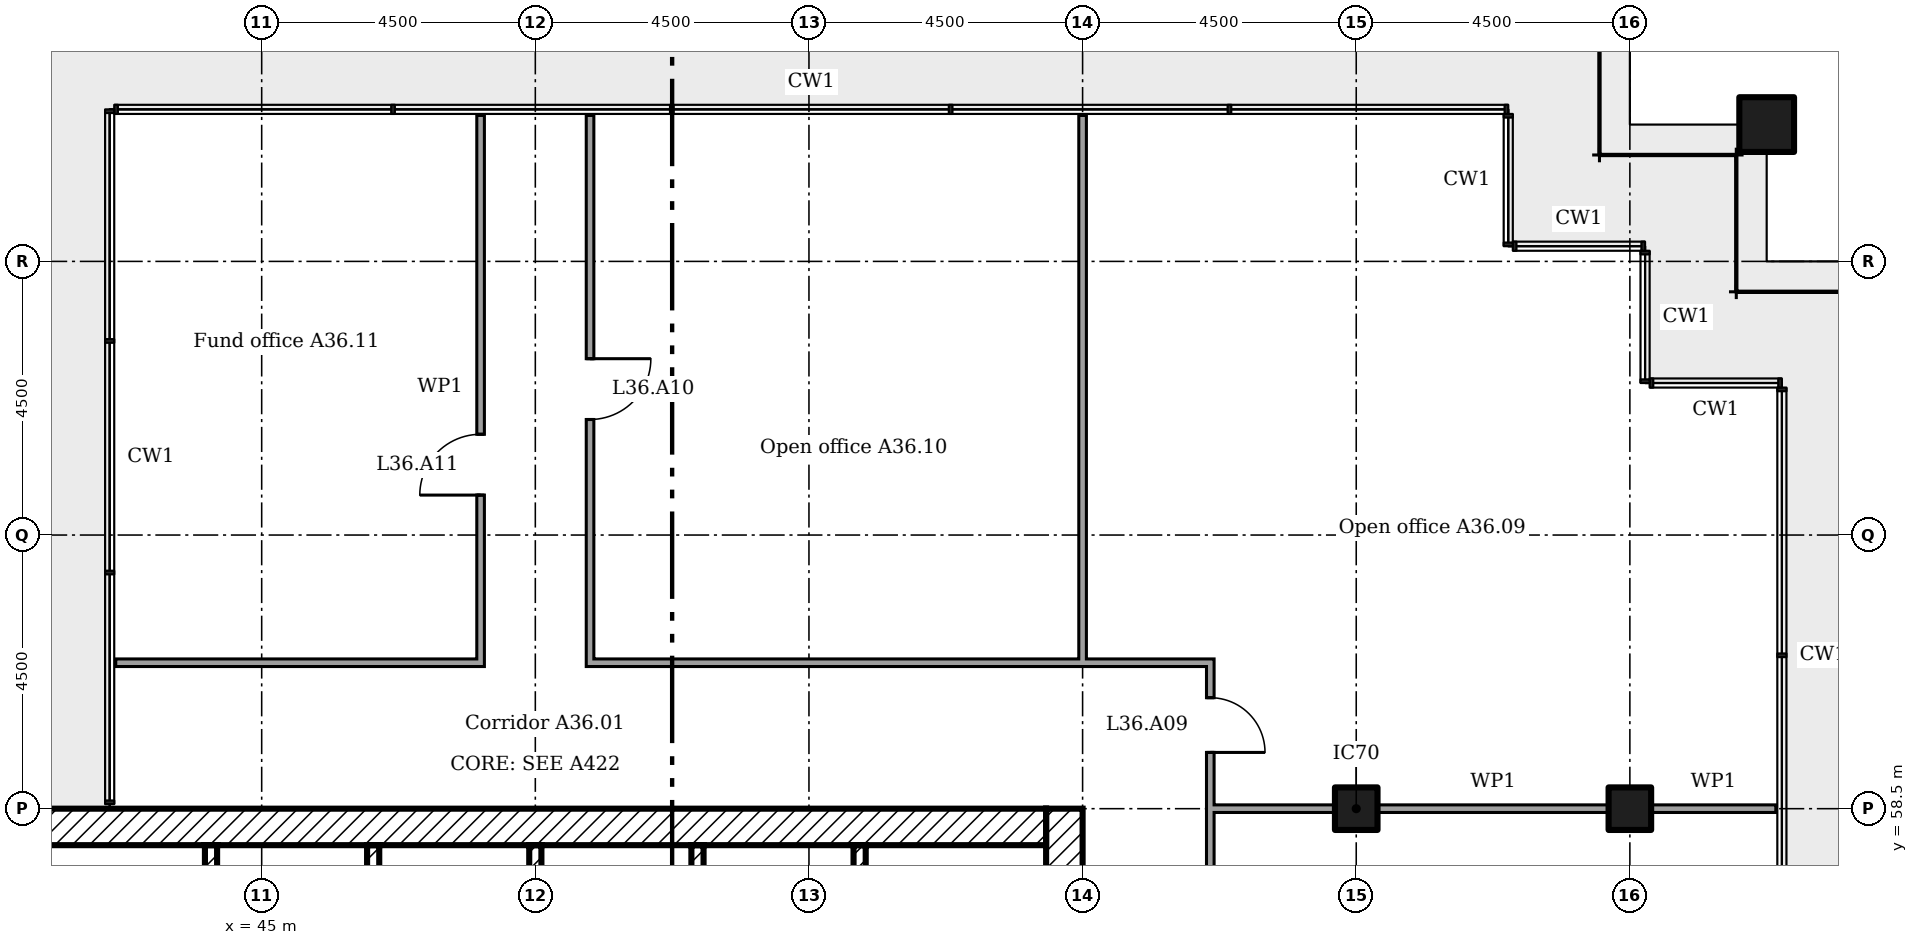
"""IFC4 building model, lengths in metres.
Left out: names, types, materials, properties, quantities, classifications, styles, units other than length and angle.
Written with IfcOpenShell. Run it as: python <this file> out.ifc"""

import sys

from ifc_helpers import new_model, si_unit, direction, frame, frame_2d, origin, origin_2d, place, context, subcontext, project, spatial, rectangle, extrude, element, fill, save


model = new_model("IFC4")
c1 = context("Model", 3, precision=1e-05, world=origin(), true_north=direction((0.0, 1.0)))
c2 = subcontext(c1, "Body", "Model", "MODEL_VIEW")
j1 = project(units=[si_unit("LENGTHUNIT", "METRE"), si_unit("PLANEANGLEUNIT", "RADIAN")], contexts=[c1])
p1 = place(None, origin())
s1 = spatial("IfcSite", under=j1, at=p1, CompositionType="ELEMENT")
p2 = place(p1, origin())
s2 = spatial("IfcBuilding", under=s1, at=p2, CompositionType="ELEMENT")
p3 = place(p2, frame((0.0, 0.0, 147.4)))
s3 = spatial("IfcBuildingStorey", under=s2, at=p3, CompositionType="ELEMENT", Elevation=147.4)
p4 = place(p3, frame((69.75, 69.75, 0.0)))
e1 = element("IfcColumn", 1, at=p4, inside=s3, PredefinedType="COLUMN", context=c2, shape_type="SweptSolid", body=[
    extrude(rectangle(XDim=0.9, YDim=0.9, at=origin_2d()), origin(), (0.0, 0.0, 1.0), 3.6),
])
for number, where in (
    (2, (63.0, 58.5, 0.0)),
    (3, (67.5, 58.5, 0.0)),
):
    element("IfcColumn", number, at=place(p3, frame(where)), inside=s3, PredefinedType="COLUMN", context=c2, shape_type="SweptSolid", body=[
        extrude(rectangle(XDim=0.7, YDim=0.7, at=origin_2d()), origin(), (0.0, 0.0, 1.0), 3.6),
    ])
p5 = place(p3, frame((58.2, 40.5, 0.0), z_axis=(0.0, 0.0, 1.0), x_axis=(0.0, 1.0, 0.0)))
e4 = element("IfcWall", 4, at=p5, inside=s3, PredefinedType="SHEAR", context=c2, shape_type="SweptSolid", body=[
    extrude(rectangle(XDim=18.0, YDim=0.6, at=frame_2d((9.0, 0.0))), origin(), (0.0, 0.0, 1.0), 3.35),
])
p6 = place(p5, frame((13.15, 0.0, 0.0)))
e5 = element("IfcOpeningElement", 5, at=p6, cuts=e4, PredefinedType="OPENING", context=c2, shape_type="SweptSolid", body=[
    extrude(rectangle(XDim=1.2, YDim=2.1, at=frame_2d((0.6, 1.05))), frame((0.0, 0.31, 0.0), z_axis=(0.0, -1.0, 0.0), x_axis=(1.0, 0.0, 0.0)), (0.0, 0.0, 1.0), 0.62),
])
p7 = place(p5, frame((3.9, 0.0, 0.0)))
e6 = element("IfcOpeningElement", 6, at=p7, cuts=e4, PredefinedType="OPENING", context=c2, shape_type="SweptSolid", body=[
    extrude(rectangle(XDim=1.8, YDim=2.1, at=frame_2d((0.9, 1.05))), frame((0.0, 0.31, 0.0), z_axis=(0.0, -1.0, 0.0), x_axis=(1.0, 0.0, 0.0)), (0.0, 0.0, 1.0), 0.62),
])
p8 = place(p5, frame((11.525, 0.0, 0.0)))
e7 = element("IfcOpeningElement", 7, at=p8, cuts=e4, PredefinedType="OPENING", context=c2, shape_type="SweptSolid", body=[
    extrude(rectangle(XDim=1.0, YDim=2.1, at=frame_2d((0.5, 1.05))), frame((0.0, 0.31, 0.0), z_axis=(0.0, -1.0, 0.0), x_axis=(1.0, 0.0, 0.0)), (0.0, 0.0, 1.0), 0.62),
])
p9 = place(p3, frame((40.5, 58.2, 0.0)))
e8 = element("IfcWall", 8, at=p9, inside=s3, PredefinedType="SHEAR", context=c2, shape_type="SweptSolid", body=[
    extrude(rectangle(XDim=17.4, YDim=0.6, at=frame_2d((8.7, 0.0))), origin(), (0.0, 0.0, 1.0), 3.35),
])
p10 = place(p3, frame((44.167, 57.9, 0.0), z_axis=(0.0, 0.0, 1.0), x_axis=(0.0, -1.0, 0.0)))
e9 = element("IfcWall", 9, at=p10, inside=s3, PredefinedType="SHEAR", context=c2, shape_type="SweptSolid", body=[
    extrude(rectangle(XDim=3.5, YDim=0.2, at=frame_2d((1.75, 0.0))), origin(), (0.0, 0.0, 1.0), 3.35),
])
p11 = place(p3, frame((46.833, 57.9, 0.0), z_axis=(0.0, 0.0, 1.0), x_axis=(0.0, -1.0, 0.0)))
e10 = element("IfcWall", 10, at=p11, inside=s3, PredefinedType="SHEAR", context=c2, shape_type="SweptSolid", body=[
    extrude(rectangle(XDim=4.6, YDim=0.2, at=frame_2d((2.3, 0.0))), origin(), (0.0, 0.0, 1.0), 3.35),
])
for number, where, z_axis, x_axis in (
    (11, (49.5, 57.9, 0.0), (0.0, 0.0, 1.0), (0.0, -1.0, 0.0)),
    (12, (52.167, 57.9, 0.0), (0.0, 0.0, 1.0), (0.0, -1.0, 0.0)),
    (13, (54.833, 57.9, 0.0), (0.0, 0.0, 1.0), (0.0, -1.0, 0.0)),
):
    element("IfcWall", number, at=place(p3, frame(where, z_axis=z_axis, x_axis=x_axis)), inside=s3, PredefinedType="SHEAR", context=c2, shape_type="SweptSolid", body=[
        extrude(rectangle(XDim=2.7, YDim=0.2, at=frame_2d((1.35, 0.0))), origin(), (0.0, 0.0, 1.0), 3.35),
    ])
p12 = place(p3, frame((60.6, 58.5, 0.0)))
e14 = element("IfcWall", 14, at=p12, inside=s3, PredefinedType="PARTITIONING", context=c2, shape_type="SweptSolid", body=[
    extrude(rectangle(XDim=2.05, YDim=0.125, at=frame_2d((1.025, 0.0))), origin(), (0.0, 0.0, 1.0), 2.676),
])
p13 = place(p3, frame((63.35, 58.5, 0.0)))
e15 = element("IfcWall", 15, at=p13, inside=s3, PredefinedType="PARTITIONING", context=c2, shape_type="SweptSolid", body=[
    extrude(rectangle(XDim=3.8, YDim=0.125, at=frame_2d((1.9, 0.0))), origin(), (0.0, 0.0, 1.0), 2.676),
])
p14 = place(p3, frame((67.85, 58.5, 0.0)))
e16 = element("IfcWall", 16, at=p14, inside=s3, PredefinedType="PARTITIONING", context=c2, shape_type="SweptSolid", body=[
    extrude(rectangle(XDim=2.05, YDim=0.125, at=frame_2d((1.025, 0.0))), origin(), (0.0, 0.0, 1.0), 2.676),
])
p15 = place(p3, frame((42.6, 60.9, 0.0)))
e17 = element("IfcWall", 17, at=p15, inside=s3, PredefinedType="PARTITIONING", context=c2, shape_type="SweptSolid", body=[
    extrude(rectangle(XDim=6.062, YDim=0.125, at=frame_2d((3.031, 0.0))), origin(), (0.0, 0.0, 1.0), 3.45),
])
p16 = place(p3, frame((50.337, 60.9, 0.0)))
e18 = element("IfcWall", 18, at=p16, inside=s3, PredefinedType="PARTITIONING", context=c2, shape_type="SweptSolid", body=[
    extrude(rectangle(XDim=10.325, YDim=0.125, at=frame_2d((5.163, 0.0))), origin(), (0.0, 0.0, 1.0), 3.45),
])
p17 = place(p3, frame((48.6, 60.962, 0.0), z_axis=(0.0, 0.0, 1.0), x_axis=(0.0, 1.0, 0.0)))
e19 = element("IfcWall", 19, at=p17, inside=s3, PredefinedType="PARTITIONING", context=c2, shape_type="SweptSolid", body=[
    extrude(rectangle(XDim=8.938, YDim=0.125, at=frame_2d((4.469, 0.0))), origin(), (0.0, 0.0, 1.0), 3.45),
])
p18 = place(p17, frame((2.695, 0.0, 0.0)))
e20 = element("IfcOpeningElement", 20, at=p18, cuts=e19, PredefinedType="OPENING", context=c2, shape_type="SweptSolid", body=[
    extrude(rectangle(XDim=1.0, YDim=2.1, at=frame_2d((0.5, 1.05))), frame((0.0, 0.073, 0.0), z_axis=(0.0, -1.0, 0.0), x_axis=(1.0, 0.0, 0.0)), (0.0, 0.0, 1.0), 0.145),
])
p19 = place(p3, frame((50.4, 60.962, 0.0), z_axis=(0.0, 0.0, 1.0), x_axis=(0.0, 1.0, 0.0)))
e21 = element("IfcWall", 21, at=p19, inside=s3, PredefinedType="PARTITIONING", context=c2, shape_type="SweptSolid", body=[
    extrude(rectangle(XDim=8.938, YDim=0.125, at=frame_2d((4.469, 0.0))), origin(), (0.0, 0.0, 1.0), 3.45),
])
p20 = place(p19, frame((3.938, 0.0, 0.0)))
e22 = element("IfcOpeningElement", 22, at=p20, cuts=e21, PredefinedType="OPENING", context=c2, shape_type="SweptSolid", body=[
    extrude(rectangle(XDim=1.0, YDim=2.1, at=frame_2d((0.5, 1.05))), frame((0.0, 0.073, 0.0), z_axis=(0.0, -1.0, 0.0), x_axis=(1.0, 0.0, 0.0)), (0.0, 0.0, 1.0), 0.145),
])
p21 = place(p3, frame((58.5, 60.9, 0.0), z_axis=(0.0, 0.0, 1.0), x_axis=(0.0, 1.0, 0.0)))
e23 = element("IfcWall", 23, at=p21, inside=s3, PredefinedType="PARTITIONING", context=c2, shape_type="SweptSolid", body=[
    extrude(rectangle(XDim=9.0, YDim=0.125, at=frame_2d((4.5, 0.0))), origin(), (0.0, 0.0, 1.0), 2.766),
])
p22 = place(p3, frame((60.6, 38.762, 0.0), z_axis=(0.0, 0.0, 1.0), x_axis=(0.0, 1.0, 0.0)))
e24 = element("IfcWall", 24, at=p22, inside=s3, PredefinedType="PARTITIONING", context=c2, shape_type="SweptSolid", body=[
    extrude(rectangle(XDim=22.075, YDim=0.125, at=frame_2d((11.038, 0.0))), origin(), (0.0, 0.0, 1.0), 3.45),
])
p23 = place(p22, frame((3.032, 0.0, 0.0)))
e25 = element("IfcOpeningElement", 25, at=p23, cuts=e24, PredefinedType="OPENING", context=c2, shape_type="SweptSolid", body=[
    extrude(rectangle(XDim=1.0, YDim=2.1, at=frame_2d((0.5, 1.05))), frame((0.0, 0.073, 0.0), z_axis=(0.0, -1.0, 0.0), x_axis=(1.0, 0.0, 0.0)), (0.0, 0.0, 1.0), 0.145),
])
p24 = place(p22, frame((8.442, 0.0, 0.0)))
e26 = element("IfcOpeningElement", 26, at=p24, cuts=e24, PredefinedType="OPENING", context=c2, shape_type="SweptSolid", body=[
    extrude(rectangle(XDim=1.0, YDim=2.1, at=frame_2d((0.5, 1.05))), frame((0.0, 0.073, 0.0), z_axis=(0.0, -1.0, 0.0), x_axis=(1.0, 0.0, 0.0)), (0.0, 0.0, 1.0), 0.145),
])
p25 = place(p22, frame((12.488, 0.0, 0.0)))
e27 = element("IfcOpeningElement", 27, at=p25, cuts=e24, PredefinedType="OPENING", context=c2, shape_type="SweptSolid", body=[
    extrude(rectangle(XDim=1.0, YDim=2.1, at=frame_2d((0.5, 1.05))), frame((0.0, 0.073, 0.0), z_axis=(0.0, -1.0, 0.0), x_axis=(1.0, 0.0, 0.0)), (0.0, 0.0, 1.0), 0.145),
])
p26 = place(p22, frame((16.532, 0.0, 0.0)))
e28 = element("IfcOpeningElement", 28, at=p26, cuts=e24, PredefinedType="OPENING", context=c2, shape_type="SweptSolid", body=[
    extrude(rectangle(XDim=1.0, YDim=2.1, at=frame_2d((0.5, 1.05))), frame((0.0, 0.073, 0.0), z_axis=(0.0, -1.0, 0.0), x_axis=(1.0, 0.0, 0.0)), (0.0, 0.0, 1.0), 0.145),
])
p27 = place(p22, frame((20.663, 0.0, 0.0)))
e29 = element("IfcOpeningElement", 29, at=p27, cuts=e24, PredefinedType="OPENING", context=c2, shape_type="SweptSolid", body=[
    extrude(rectangle(XDim=0.9, YDim=2.1, at=frame_2d((0.45, 1.05))), frame((0.0, 0.073, 0.0), z_axis=(0.0, -1.0, 0.0), x_axis=(1.0, 0.0, 0.0)), (0.0, 0.0, 1.0), 0.145),
])
p28 = place(p27, frame((0.9, 0.0, 0.0), x_axis=(-1.0, 0.0, 0.0)))
e30 = element("IfcDoor", 30, at=p28, inside=s3, OperationType="SINGLE_SWING_LEFT", PredefinedType="DOOR", context=c2, shape_type="SweptSolid", body=[
    extrude(rectangle(XDim=0.9, YDim=2.1, at=frame_2d((0.45, 1.05))), frame((0.0, 0.025, 0.0), z_axis=(0.0, -1.0, 0.0), x_axis=(1.0, 0.0, 0.0)), (0.0, 0.0, 1.0), 0.05),
])
fill(e29, e30)
p29 = place(p20, frame((1.0, 0.0, 0.0), x_axis=(-1.0, 0.0, 0.0)))
e31 = element("IfcDoor", 31, at=p29, inside=s3, OperationType="SINGLE_SWING_RIGHT", PredefinedType="DOOR", context=c2, shape_type="SweptSolid", body=[
    extrude(rectangle(XDim=1.0, YDim=2.1, at=frame_2d((0.5, 1.05))), frame((0.0, 0.025, 0.0), z_axis=(0.0, -1.0, 0.0), x_axis=(1.0, 0.0, 0.0)), (0.0, 0.0, 1.0), 0.05),
])
fill(e22, e31)
p30 = place(p18, origin())
e32 = element("IfcDoor", 32, at=p30, inside=s3, OperationType="SINGLE_SWING_RIGHT", PredefinedType="DOOR", context=c2, shape_type="SweptSolid", body=[
    extrude(rectangle(XDim=1.0, YDim=2.1, at=frame_2d((0.5, 1.05))), frame((0.0, 0.025, 0.0), z_axis=(0.0, -1.0, 0.0), x_axis=(1.0, 0.0, 0.0)), (0.0, 0.0, 1.0), 0.05),
])
fill(e20, e32)
save(model, sys.argv[1])
